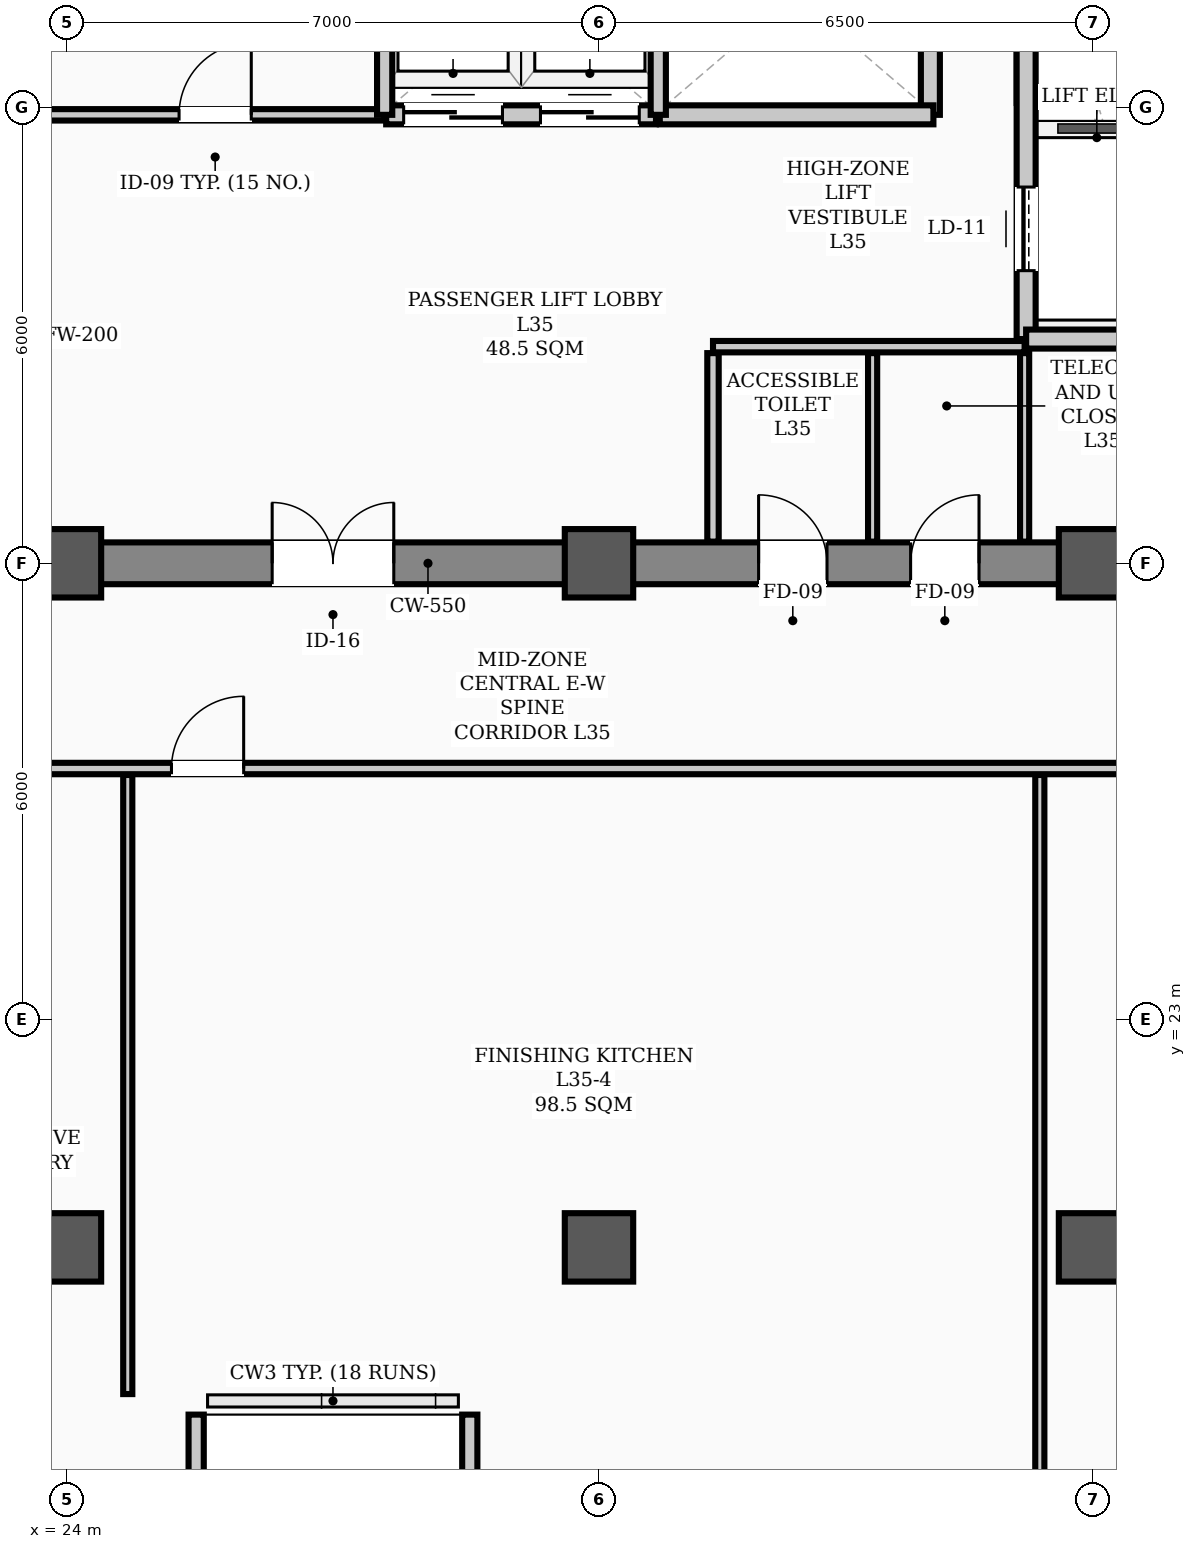
"""IFC4 building model, lengths in metres.
Left out: names, types, materials, properties, quantities, classifications, styles, units other than length and angle.
Written with IfcOpenShell. Run it as: python <this file> out.ifc"""

import sys

from ifc_helpers import new_model, si_unit, direction, frame, frame_2d, origin, origin_2d, place, context, subcontext, project, spatial, rectangle, hollow_rectangle, extrude, element, fill, save


model = new_model("IFC4")
c1 = context("Model", 3, precision=1e-05, world=origin(), true_north=direction((0.0, 1.0)))
c2 = subcontext(c1, "Body", "Model", "MODEL_VIEW")
j1 = project(units=[si_unit("LENGTHUNIT", "METRE"), si_unit("PLANEANGLEUNIT", "RADIAN")], contexts=[c1])
p1 = place(None, origin())
s1 = spatial("IfcSite", under=j1, at=p1, CompositionType="ELEMENT")
p2 = place(p1, origin())
s2 = spatial("IfcBuilding", under=s1, at=p2, CompositionType="ELEMENT")
p3 = place(p2, frame((0.0, 0.0, 142.2)))
s3 = spatial("IfcBuildingStorey", under=s2, at=p3, CompositionType="ELEMENT", Elevation=142.2)
for number, where, z_axis, x_axis in (
    (1, (24.0, 29.0, 0.0), (0.0, 0.0, 1.0), (1.0, 0.0, 0.0)),
    (2, (31.0, 29.0, 0.0), (0.0, 0.0, 1.0), (1.0, 0.0, 0.0)),
    (3, (37.5, 29.0, 0.0), (0.0, 0.0, 1.0), (1.0, 0.0, 0.0)),
    (4, (24.0, 20.0, 0.0), (0.0, 0.0, 1.0), (1.0, 0.0, 0.0)),
    (5, (31.0, 20.0, 0.0), (0.0, 0.0, 1.0), (1.0, 0.0, 0.0)),
    (6, (37.5, 20.0, 0.0), (0.0, 0.0, 1.0), (1.0, 0.0, 0.0)),
):
    element("IfcColumn", number, at=place(p3, frame(where, z_axis=z_axis, x_axis=x_axis)), inside=s3, PredefinedType="COLUMN", context=c2, shape_type="SweptSolid", body=[
        extrude(hollow_rectangle(XDim=0.9, YDim=0.9, WallThickness=0.035, InnerFilletRadius=0.017, OuterFilletRadius=0.052, at=origin_2d()), origin(), (0.0, 0.0, 1.0), 3.9),
    ])
for number, where, z_axis, x_axis in (
    (7, (25.7, 16.1, 0.0), (0.0, 0.0, 1.0), (0.0, 1.0, 0.0)),
    (8, (29.3, 17.8, 0.0), (0.0, 0.0, 1.0), (0.0, -1.0, 0.0)),
):
    element("IfcWall", number, at=place(p3, frame(where, z_axis=z_axis, x_axis=x_axis)), inside=s3, PredefinedType="PARAPET", context=c2, shape_type="SweptSolid", body=[
        extrude(rectangle(XDim=1.7, YDim=0.2, at=frame_2d((0.85, 0.0))), origin(), (0.0, 0.0, 1.0), 1.2),
    ])
p4 = place(p3, frame((13.5, 29.0, 0.0), z_axis=(0.0, 0.0, 1.0), x_axis=(1.0, 0.0, 0.0)))
e9 = element("IfcWall", 9, at=p4, inside=s3, PredefinedType="SHEAR", context=c2, shape_type="SweptSolid", body=[
    extrude(rectangle(XDim=30.5, YDim=0.55, at=frame_2d((15.25, 0.0))), origin(), (0.0, 0.0, 1.0), 3.72),
])
p5 = place(p4, frame((1.75, 0.0, 0.0)))
e10 = element("IfcOpeningElement", 10, at=p5, cuts=e9, PredefinedType="OPENING", context=c2, shape_type="SweptSolid", body=[
    extrude(rectangle(XDim=1.1, YDim=2.08, at=frame_2d((0.55, 1.04))), frame((0.0, 0.285, 0.0), z_axis=(0.0, -1.0, 0.0), x_axis=(1.0, 0.0, 0.0)), (0.0, 0.0, 1.0), 0.57),
])
p6 = place(p4, frame((26.7, 0.0, 0.0)))
e11 = element("IfcOpeningElement", 11, at=p6, cuts=e9, PredefinedType="OPENING", context=c2, shape_type="SweptSolid", body=[
    extrude(rectangle(XDim=1.1, YDim=2.08, at=frame_2d((0.55, 1.04))), frame((0.0, 0.285, 0.0), z_axis=(0.0, -1.0, 0.0), x_axis=(1.0, 0.0, 0.0)), (0.0, 0.0, 1.0), 0.57),
])
p7 = place(p4, frame((6.8, 0.0, 0.0)))
e12 = element("IfcOpeningElement", 12, at=p7, cuts=e9, PredefinedType="OPENING", context=c2, shape_type="SweptSolid", body=[
    extrude(rectangle(XDim=1.1, YDim=2.08, at=frame_2d((0.55, 1.04))), frame((0.0, 0.285, 0.0), z_axis=(0.0, -1.0, 0.0), x_axis=(1.0, 0.0, 0.0)), (0.0, 0.0, 1.0), 0.57),
])
p8 = place(p4, frame((13.2, 0.0, 0.0)))
e13 = element("IfcOpeningElement", 13, at=p8, cuts=e9, PredefinedType="OPENING", context=c2, shape_type="SweptSolid", body=[
    extrude(rectangle(XDim=1.6, YDim=2.08, at=frame_2d((0.8, 1.04))), frame((0.0, 0.285, 0.0), z_axis=(0.0, -1.0, 0.0), x_axis=(1.0, 0.0, 0.0)), (0.0, 0.0, 1.0), 0.57),
])
p9 = place(p4, frame((19.6, 0.0, 0.0)))
e14 = element("IfcOpeningElement", 14, at=p9, cuts=e9, PredefinedType="OPENING", context=c2, shape_type="SweptSolid", body=[
    extrude(rectangle(XDim=0.9, YDim=2.08, at=frame_2d((0.45, 1.04))), frame((0.0, 0.285, 0.0), z_axis=(0.0, -1.0, 0.0), x_axis=(1.0, 0.0, 0.0)), (0.0, 0.0, 1.0), 0.57),
])
p10 = place(p4, frame((21.6, 0.0, 0.0)))
e15 = element("IfcOpeningElement", 15, at=p10, cuts=e9, PredefinedType="OPENING", context=c2, shape_type="SweptSolid", body=[
    extrude(rectangle(XDim=0.9, YDim=2.08, at=frame_2d((0.45, 1.04))), frame((0.0, 0.285, 0.0), z_axis=(0.0, -1.0, 0.0), x_axis=(1.0, 0.0, 0.0)), (0.0, 0.0, 1.0), 0.57),
])
p11 = place(p3, frame((36.62, 31.95, 0.0), z_axis=(0.0, 0.0, 1.0), x_axis=(0.0, 1.0, 0.0)))
e16 = element("IfcWall", 16, at=p11, inside=s3, PredefinedType="STANDARD", context=c2, shape_type="SweptSolid", body=[
    extrude(rectangle(XDim=6.0, YDim=0.25, at=frame_2d((3.0, 0.0))), origin(), (0.0, 0.0, 1.0), 3.3),
])
p12 = place(p11, frame((0.9, 0.0, 0.0)))
e17 = element("IfcOpeningElement", 17, at=p12, cuts=e16, PredefinedType="OPENING", context=c2, shape_type="SweptSolid", body=[
    extrude(rectangle(XDim=1.1, YDim=2.08, at=frame_2d((0.55, 1.04))), frame((0.0, 0.135, 0.0), z_axis=(0.0, -1.0, 0.0), x_axis=(1.0, 0.0, 0.0)), (0.0, 0.0, 1.0), 0.27),
])
p13 = place(p11, frame((4.0, 0.0, 0.0)))
e18 = element("IfcOpeningElement", 18, at=p13, cuts=e16, PredefinedType="OPENING", context=c2, shape_type="SweptSolid", body=[
    extrude(rectangle(XDim=1.1, YDim=2.08, at=frame_2d((0.55, 1.04))), frame((0.0, 0.135, 0.0), z_axis=(0.0, -1.0, 0.0), x_axis=(1.0, 0.0, 0.0)), (0.0, 0.0, 1.0), 0.27),
])
p14 = place(p3, frame((36.62, 31.95, 0.0), z_axis=(0.0, 0.0, 1.0), x_axis=(1.0, 0.0, 0.0)))
e19 = element("IfcWall", 19, at=p14, inside=s3, PredefinedType="STANDARD", context=c2, shape_type="SweptSolid", body=[
    extrude(rectangle(XDim=1.9, YDim=0.25, at=frame_2d((0.95, 0.0))), origin(), (0.0, 0.0, 1.0), 3.48),
])
p15 = place(p3, frame((35.36, 34.9, 0.0), z_axis=(0.0, 0.0, 1.0), x_axis=(0.0, 1.0, 0.0)))
e20 = element("IfcWall", 20, at=p15, inside=s3, PredefinedType="STANDARD", context=c2, shape_type="SweptSolid", body=[
    extrude(rectangle(XDim=3.05, YDim=0.25, at=frame_2d((1.525, 0.0))), origin(), (0.0, 0.0, 1.0), 3.3),
])
p16 = place(p3, frame((28.2, 34.9, 0.0), z_axis=(0.0, 0.0, 1.0), x_axis=(1.0, 0.0, 0.0)))
e21 = element("IfcWall", 21, at=p16, inside=s3, PredefinedType="STANDARD", context=c2, shape_type="SweptSolid", body=[
    extrude(rectangle(XDim=3.55, YDim=0.25, at=frame_2d((1.775, 0.0))), origin(), (0.0, 0.0, 1.0), 3.72),
])
p17 = place(p16, frame((0.23, 0.0, 0.0)))
e22 = element("IfcOpeningElement", 22, at=p17, cuts=e21, PredefinedType="OPENING", context=c2, shape_type="SweptSolid", body=[
    extrude(rectangle(XDim=1.3, YDim=2.08, at=frame_2d((0.65, 1.04))), frame((0.0, 0.135, 0.0), z_axis=(0.0, -1.0, 0.0), x_axis=(1.0, 0.0, 0.0)), (0.0, 0.0, 1.0), 0.27),
])
p18 = place(p16, frame((2.03, 0.0, 0.0)))
e23 = element("IfcOpeningElement", 23, at=p18, cuts=e21, PredefinedType="OPENING", context=c2, shape_type="SweptSolid", body=[
    extrude(rectangle(XDim=1.3, YDim=2.08, at=frame_2d((0.65, 1.04))), frame((0.0, 0.135, 0.0), z_axis=(0.0, -1.0, 0.0), x_axis=(1.0, 0.0, 0.0)), (0.0, 0.0, 1.0), 0.27),
])
p19 = place(p3, frame((31.8, 34.9, 0.0), z_axis=(0.0, 0.0, 1.0), x_axis=(1.0, 0.0, 0.0)))
e24 = element("IfcWall", 24, at=p19, inside=s3, PredefinedType="STANDARD", context=c2, shape_type="SweptSolid", body=[
    extrude(rectangle(XDim=3.6, YDim=0.25, at=frame_2d((1.8, 0.0))), origin(), (0.0, 0.0, 1.0), 3.72),
])
p20 = place(p3, frame((23.6, 34.9, 0.0), z_axis=(0.0, 0.0, 1.0), x_axis=(1.0, 0.0, 0.0)))
e25 = element("IfcWall", 25, at=p20, inside=s3, PredefinedType="PARTITIONING", context=c2, shape_type="SweptSolid", body=[
    extrude(rectangle(XDim=4.58, YDim=0.15, at=frame_2d((2.29, 0.0))), origin(), (0.0, 0.0, 1.0), 3.72),
])
p21 = place(p20, frame((1.875, 0.0, 0.0)))
e26 = element("IfcOpeningElement", 26, at=p21, cuts=e25, PredefinedType="OPENING", context=c2, shape_type="SweptSolid", body=[
    extrude(rectangle(XDim=0.95, YDim=2.08, at=frame_2d((0.475, 1.04))), frame((0.0, 0.085, 0.0), z_axis=(0.0, -1.0, 0.0), x_axis=(1.0, 0.0, 0.0)), (0.0, 0.0, 1.0), 0.17),
])
p22 = place(p3, frame((32.5, 31.85, 0.0), z_axis=(0.0, 0.0, 1.0), x_axis=(1.0, 0.0, 0.0)))
e27 = element("IfcWall", 27, at=p22, inside=s3, PredefinedType="PARTITIONING", context=c2, shape_type="SweptSolid", body=[
    extrude(rectangle(XDim=4.1, YDim=0.15, at=frame_2d((2.05, 0.0))), origin(), (0.0, 0.0, 1.0), 3.72),
])
p23 = place(p3, frame((2.31, 26.3, 0.0), z_axis=(0.0, 0.0, 1.0), x_axis=(1.0, 0.0, 0.0)))
e28 = element("IfcWall", 28, at=p23, inside=s3, PredefinedType="PARTITIONING", context=c2, shape_type="SweptSolid", body=[
    extrude(rectangle(XDim=46.38, YDim=0.15, at=frame_2d((23.19, 0.0))), origin(), (0.0, 0.0, 1.0), 3.1),
])
p24 = place(p23, frame((9.39, 0.0, 0.0)))
e29 = element("IfcOpeningElement", 29, at=p24, cuts=e28, PredefinedType="OPENING", context=c2, shape_type="SweptSolid", body=[
    extrude(rectangle(XDim=0.95, YDim=2.08, at=frame_2d((0.475, 1.04))), frame((0.0, 0.085, 0.0), z_axis=(0.0, -1.0, 0.0), x_axis=(1.0, 0.0, 0.0)), (0.0, 0.0, 1.0), 0.17),
])
p25 = place(p23, frame((14.215, 0.0, 0.0)))
e30 = element("IfcOpeningElement", 30, at=p25, cuts=e28, PredefinedType="OPENING", context=c2, shape_type="SweptSolid", body=[
    extrude(rectangle(XDim=0.95, YDim=2.08, at=frame_2d((0.475, 1.04))), frame((0.0, 0.085, 0.0), z_axis=(0.0, -1.0, 0.0), x_axis=(1.0, 0.0, 0.0)), (0.0, 0.0, 1.0), 0.17),
])
p26 = place(p23, frame((19.115, 0.0, 0.0)))
e31 = element("IfcOpeningElement", 31, at=p26, cuts=e28, PredefinedType="OPENING", context=c2, shape_type="SweptSolid", body=[
    extrude(rectangle(XDim=0.95, YDim=2.08, at=frame_2d((0.475, 1.04))), frame((0.0, 0.085, 0.0), z_axis=(0.0, -1.0, 0.0), x_axis=(1.0, 0.0, 0.0)), (0.0, 0.0, 1.0), 0.17),
])
p27 = place(p23, frame((23.065, 0.0, 0.0)))
e32 = element("IfcOpeningElement", 32, at=p27, cuts=e28, PredefinedType="OPENING", context=c2, shape_type="SweptSolid", body=[
    extrude(rectangle(XDim=0.95, YDim=2.08, at=frame_2d((0.475, 1.04))), frame((0.0, 0.085, 0.0), z_axis=(0.0, -1.0, 0.0), x_axis=(1.0, 0.0, 0.0)), (0.0, 0.0, 1.0), 0.17),
])
p28 = place(p23, frame((37.715, 0.0, 0.0)))
e33 = element("IfcOpeningElement", 33, at=p28, cuts=e28, PredefinedType="OPENING", context=c2, shape_type="SweptSolid", body=[
    extrude(rectangle(XDim=0.95, YDim=2.08, at=frame_2d((0.475, 1.04))), frame((0.0, 0.085, 0.0), z_axis=(0.0, -1.0, 0.0), x_axis=(1.0, 0.0, 0.0)), (0.0, 0.0, 1.0), 0.17),
])
p29 = place(p23, frame((43.66, 0.0, 0.0)))
e34 = element("IfcOpeningElement", 34, at=p29, cuts=e28, PredefinedType="OPENING", context=c2, shape_type="SweptSolid", body=[
    extrude(rectangle(XDim=0.95, YDim=2.08, at=frame_2d((0.475, 1.04))), frame((0.0, 0.085, 0.0), z_axis=(0.0, -1.0, 0.0), x_axis=(1.0, 0.0, 0.0)), (0.0, 0.0, 1.0), 0.17),
])
p30 = place(p3, frame((32.5, 29.285, 0.0), z_axis=(0.0, 0.0, 1.0), x_axis=(0.0, 1.0, 0.0)))
e35 = element("IfcWall", 35, at=p30, inside=s3, PredefinedType="PARTITIONING", context=c2, shape_type="SweptSolid", body=[
    extrude(rectangle(XDim=2.48, YDim=0.15, at=frame_2d((1.24, 0.0))), origin(), (0.0, 0.0, 1.0), 3.3),
])
for number, where, z_axis, x_axis in (
    (36, (36.6, 29.285, 0.0), (0.0, 0.0, 1.0), (0.0, 1.0, 0.0)),
    (37, (34.6, 29.285, 0.0), (0.0, 0.0, 1.0), (0.0, 1.0, 0.0)),
):
    element("IfcWall", number, at=place(p3, frame(where, z_axis=z_axis, x_axis=x_axis)), inside=s3, PredefinedType="PARTITIONING", context=c2, shape_type="SweptSolid", body=[
        extrude(rectangle(XDim=2.48, YDim=0.12, at=frame_2d((1.24, 0.0))), origin(), (0.0, 0.0, 1.0), 3.3),
    ])
p31 = place(p3, frame((24.8, 18.07, 0.0), z_axis=(0.0, 0.0, 1.0), x_axis=(0.0, 1.0, 0.0)))
e38 = element("IfcWall", 38, at=p31, inside=s3, PredefinedType="PARTITIONING", context=c2, shape_type="SweptSolid", body=[
    extrude(rectangle(XDim=8.145, YDim=0.12, at=frame_2d((4.073, 0.0))), origin(), (0.0, 0.0, 1.0), 3.0),
])
p32 = place(p3, frame((36.8, 16.31, 0.0), z_axis=(0.0, 0.0, 1.0), x_axis=(0.0, 1.0, 0.0)))
e39 = element("IfcWall", 39, at=p32, inside=s3, PredefinedType="PARTITIONING", context=c2, shape_type="SweptSolid", body=[
    extrude(rectangle(XDim=9.905, YDim=0.12, at=frame_2d((4.953, 0.0))), origin(), (0.0, 0.0, 1.0), 3.0),
])
for number, where, z_axis, x_axis in (
    (40, (28.18, 34.9, 0.0), (0.0, 0.0, 1.0), (0.0, 1.0, 0.0)),
    (41, (31.78, 34.9, 0.0), (0.0, 0.0, 1.0), (0.0, 1.0, 0.0)),
):
    element("IfcWall", number, at=place(p3, frame(where, z_axis=z_axis, x_axis=x_axis)), inside=s3, PredefinedType="STANDARD", context=c2, shape_type="SweptSolid", body=[
        extrude(rectangle(XDim=3.12, YDim=0.2, at=frame_2d((1.56, 0.0))), origin(), (0.0, 0.0, 1.0), 3.3),
    ])
p33 = place(p8, origin())
e42 = element("IfcDoor", 42, at=p33, inside=s3, OperationType="DOUBLE_DOOR_SINGLE_SWING", PredefinedType="DOOR", context=c2, shape_type="SweptSolid", body=[
    extrude(rectangle(XDim=1.6, YDim=2.08, at=frame_2d((0.8, 1.04))), frame((0.0, 0.025, 0.0), z_axis=(0.0, -1.0, 0.0), x_axis=(1.0, 0.0, 0.0)), (0.0, 0.0, 1.0), 0.05),
])
fill(e13, e42)
p34 = place(p21, origin())
e43 = element("IfcDoor", 43, at=p34, inside=s3, OperationType="SINGLE_SWING_RIGHT", PredefinedType="DOOR", context=c2, shape_type="SweptSolid", body=[
    extrude(rectangle(XDim=0.95, YDim=2.08, at=frame_2d((0.475, 1.04))), frame((0.0, 0.025, 0.0), z_axis=(0.0, -1.0, 0.0), x_axis=(1.0, 0.0, 0.0)), (0.0, 0.0, 1.0), 0.05),
])
fill(e26, e43)
p35 = place(p9, origin())
e44 = element("IfcDoor", 44, at=p35, inside=s3, OperationType="SINGLE_SWING_LEFT", PredefinedType="DOOR", context=c2, shape_type="SweptSolid", body=[
    extrude(rectangle(XDim=0.9, YDim=2.08, at=frame_2d((0.45, 1.04))), frame((0.0, 0.025, 0.0), z_axis=(0.0, -1.0, 0.0), x_axis=(1.0, 0.0, 0.0)), (0.0, 0.0, 1.0), 0.05),
])
fill(e14, e44)
p36 = place(p10, origin())
e45 = element("IfcDoor", 45, at=p36, inside=s3, OperationType="SINGLE_SWING_RIGHT", PredefinedType="DOOR", context=c2, shape_type="SweptSolid", body=[
    extrude(rectangle(XDim=0.9, YDim=2.08, at=frame_2d((0.45, 1.04))), frame((0.0, 0.025, 0.0), z_axis=(0.0, -1.0, 0.0), x_axis=(1.0, 0.0, 0.0)), (0.0, 0.0, 1.0), 0.05),
])
fill(e15, e45)
p37 = place(p27, origin())
e46 = element("IfcDoor", 46, at=p37, inside=s3, OperationType="SINGLE_SWING_RIGHT", PredefinedType="DOOR", context=c2, shape_type="SweptSolid", body=[
    extrude(rectangle(XDim=0.95, YDim=2.08, at=frame_2d((0.475, 1.04))), frame((0.0, 0.025, 0.0), z_axis=(0.0, -1.0, 0.0), x_axis=(1.0, 0.0, 0.0)), (0.0, 0.0, 1.0), 0.05),
])
fill(e32, e46)
p38 = place(p12, origin())
e47 = element("IfcDoor", 47, at=p38, inside=s3, OperationType="SLIDING_TO_LEFT", PredefinedType="DOOR", context=c2, shape_type="SweptSolid", body=[
    extrude(rectangle(XDim=1.1, YDim=2.08, at=frame_2d((0.55, 1.04))), frame((0.0, 0.025, 0.0), z_axis=(0.0, -1.0, 0.0), x_axis=(1.0, 0.0, 0.0)), (0.0, 0.0, 1.0), 0.05),
])
fill(e17, e47)
p39 = place(p17, origin())
e48 = element("IfcDoor", 48, at=p39, inside=s3, OperationType="DOUBLE_DOOR_SLIDING", PredefinedType="DOOR", context=c2, shape_type="SweptSolid", body=[
    extrude(rectangle(XDim=1.3, YDim=2.08, at=frame_2d((0.65, 1.04))), frame((0.0, 0.025, 0.0), z_axis=(0.0, -1.0, 0.0), x_axis=(1.0, 0.0, 0.0)), (0.0, 0.0, 1.0), 0.05),
])
fill(e22, e48)
p40 = place(p18, origin())
e49 = element("IfcDoor", 49, at=p40, inside=s3, OperationType="DOUBLE_DOOR_SLIDING", PredefinedType="DOOR", context=c2, shape_type="SweptSolid", body=[
    extrude(rectangle(XDim=1.3, YDim=2.08, at=frame_2d((0.65, 1.04))), frame((0.0, 0.025, 0.0), z_axis=(0.0, -1.0, 0.0), x_axis=(1.0, 0.0, 0.0)), (0.0, 0.0, 1.0), 0.05),
])
fill(e23, e49)
save(model, sys.argv[1])
